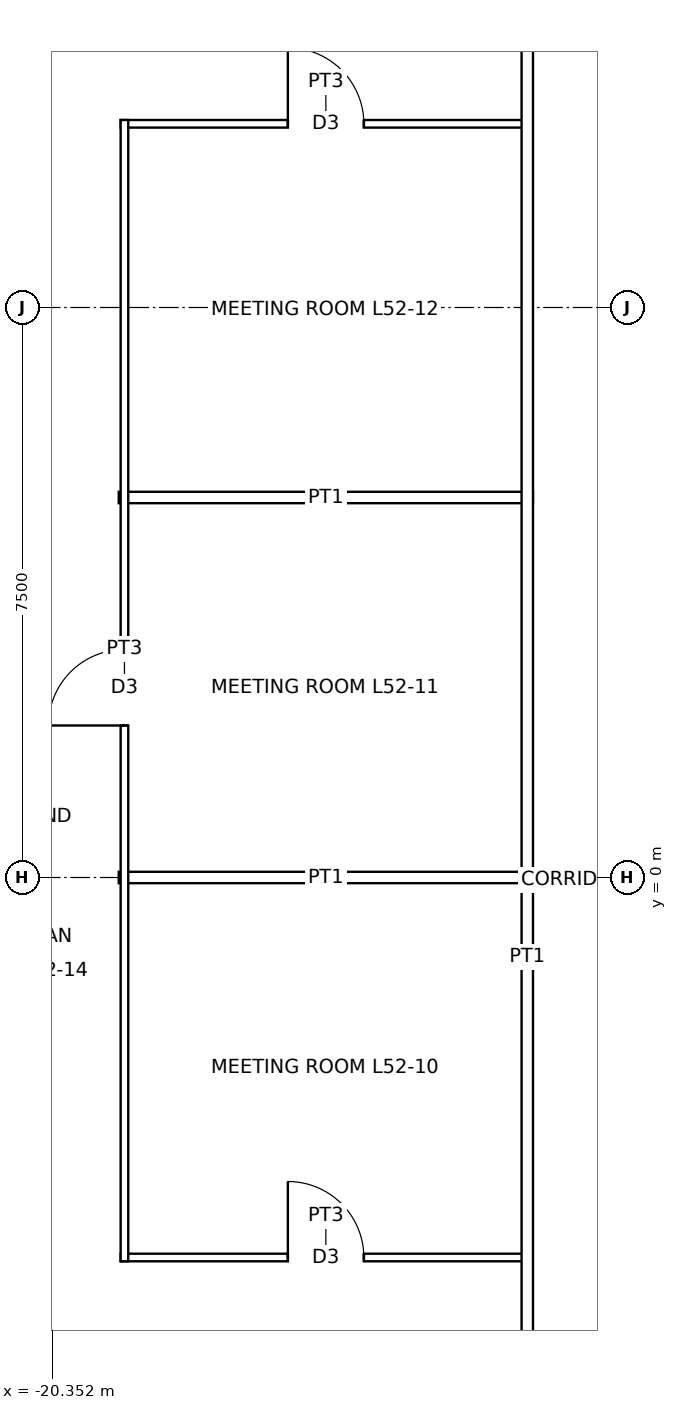
"""IFC4 building model, lengths in metres.
Left out: names, types, materials, properties, quantities, classifications, styles, units other than length and angle.
Written with IfcOpenShell. Run it as: python <this file> out.ifc"""

import sys

from ifc_helpers import new_model, si_unit, direction, frame, frame_2d, origin, place, context, subcontext, project, spatial, rectangle, extrude, element, fill, save


model = new_model("IFC4")
c1 = context("Model", 3, precision=1e-05, world=origin(), true_north=direction((0.0, 1.0)))
c2 = subcontext(c1, "Body", "Model", "MODEL_VIEW")
j1 = project(units=[si_unit("LENGTHUNIT", "METRE"), si_unit("PLANEANGLEUNIT", "RADIAN")], contexts=[c1])
p1 = place(None, origin())
s1 = spatial("IfcSite", under=j1, at=p1, CompositionType="ELEMENT")
p2 = place(p1, origin())
s2 = spatial("IfcBuilding", under=s1, at=p2, CompositionType="ELEMENT")
p3 = place(p2, frame((0.0, 0.0, 241.9)))
s3 = spatial("IfcBuildingStorey", under=s2, at=p3, CompositionType="ELEMENT", Elevation=241.9)
p4 = place(p3, frame((-19.45, -5.0, 0.0), z_axis=(0.0, 0.0, 1.0), x_axis=(1.0, 0.0, 0.0)))
e1 = element("IfcWall", 1, at=p4, inside=s3, PredefinedType="PARTITIONING", context=c2, shape_type="SweptSolid", body=[
    extrude(rectangle(XDim=5.4, YDim=0.1, at=frame_2d((2.7, 0.0))), origin(), (0.0, 0.0, 1.0), 3.85),
])
p5 = place(p4, frame((2.2, 0.0, 0.0)))
e2 = element("IfcOpeningElement", 2, at=p5, cuts=e1, PredefinedType="OPENING", context=c2, shape_type="SweptSolid", body=[
    extrude(rectangle(XDim=1.0, YDim=2.1, at=frame_2d((0.5, 1.05))), frame((0.0, 0.06, 0.0), z_axis=(0.0, -1.0, 0.0), x_axis=(1.0, 0.0, 0.0)), (0.0, 0.0, 1.0), 0.12),
])
p6 = place(p3, frame((-19.475, 0.0, 0.0), z_axis=(0.0, 0.0, 1.0), x_axis=(1.0, 0.0, 0.0)))
e3 = element("IfcWall", 3, at=p6, inside=s3, PredefinedType="PARTITIONING", context=c2, shape_type="SweptSolid", body=[
    extrude(rectangle(XDim=5.45, YDim=0.15, at=frame_2d((2.725, 0.0))), origin(), (0.0, 0.0, 1.0), 3.238),
])
p7 = place(p3, frame((-19.475, 5.0, 0.0), z_axis=(0.0, 0.0, 1.0), x_axis=(1.0, 0.0, 0.0)))
e4 = element("IfcWall", 4, at=p7, inside=s3, PredefinedType="PARTITIONING", context=c2, shape_type="SweptSolid", body=[
    extrude(rectangle(XDim=5.45, YDim=0.15, at=frame_2d((2.725, 0.0))), origin(), (0.0, 0.0, 1.0), 3.85),
])
p8 = place(p3, frame((-19.45, 9.917, 0.0), z_axis=(0.0, 0.0, 1.0), x_axis=(1.0, 0.0, 0.0)))
e5 = element("IfcWall", 5, at=p8, inside=s3, PredefinedType="PARTITIONING", context=c2, shape_type="SweptSolid", body=[
    extrude(rectangle(XDim=5.4, YDim=0.1, at=frame_2d((2.7, 0.0))), origin(), (0.0, 0.0, 1.0), 3.85),
])
p9 = place(p8, frame((2.2, 0.0, 0.0)))
e6 = element("IfcOpeningElement", 6, at=p9, cuts=e5, PredefinedType="OPENING", context=c2, shape_type="SweptSolid", body=[
    extrude(rectangle(XDim=1.0, YDim=2.1, at=frame_2d((0.5, 1.05))), frame((0.0, 0.06, 0.0), z_axis=(0.0, -1.0, 0.0), x_axis=(1.0, 0.0, 0.0)), (0.0, 0.0, 1.0), 0.12),
])
p10 = place(p3, frame((-19.4, -5.05, 0.0), z_axis=(0.0, 0.0, 1.0), x_axis=(0.0, 1.0, 0.0)))
e7 = element("IfcWall", 7, at=p10, inside=s3, PredefinedType="PARTITIONING", context=c2, shape_type="SweptSolid", body=[
    extrude(rectangle(XDim=15.017, YDim=0.1, at=frame_2d((7.509, 0.0))), origin(), (0.0, 0.0, 1.0), 3.85),
])
p11 = place(p10, frame((7.05, 0.0, 0.0)))
e8 = element("IfcOpeningElement", 8, at=p11, cuts=e7, PredefinedType="OPENING", context=c2, shape_type="SweptSolid", body=[
    extrude(rectangle(XDim=1.0, YDim=2.1, at=frame_2d((0.5, 1.05))), frame((0.0, 0.06, 0.0), z_axis=(0.0, -1.0, 0.0), x_axis=(1.0, 0.0, 0.0)), (0.0, 0.0, 1.0), 0.12),
])
p12 = place(p3, frame((-14.1, -14.175, 0.0), z_axis=(0.0, 0.0, 1.0), x_axis=(0.0, 1.0, 0.0)))
e9 = element("IfcWall", 9, at=p12, inside=s3, PredefinedType="PARTITIONING", context=c2, shape_type="SweptSolid", body=[
    extrude(rectangle(XDim=26.25, YDim=0.15, at=frame_2d((13.125, 0.0))), origin(), (0.0, 0.0, 1.0), 3.85),
])
p13 = place(p12, frame((4.125, 0.0, 0.0)))
e10 = element("IfcOpeningElement", 10, at=p13, cuts=e9, PredefinedType="OPENING", context=c2, shape_type="SweptSolid", body=[
    extrude(rectangle(XDim=1.0, YDim=2.4, at=frame_2d((0.5, 1.2))), frame((0.0, 0.085, 0.0), z_axis=(0.0, -1.0, 0.0), x_axis=(1.0, 0.0, 0.0)), (0.0, 0.0, 1.0), 0.17),
])
p14 = place(p5, origin())
e11 = element("IfcDoor", 11, at=p14, inside=s3, OperationType="SINGLE_SWING_LEFT", PredefinedType="DOOR", context=c2, shape_type="SweptSolid", body=[
    extrude(rectangle(XDim=1.0, YDim=2.1, at=frame_2d((0.5, 1.05))), frame((0.0, 0.025, 0.0), z_axis=(0.0, -1.0, 0.0), x_axis=(1.0, 0.0, 0.0)), (0.0, 0.0, 1.0), 0.05),
])
fill(e2, e11)
p15 = place(p11, origin())
e12 = element("IfcDoor", 12, at=p15, inside=s3, OperationType="SINGLE_SWING_LEFT", PredefinedType="DOOR", context=c2, shape_type="SweptSolid", body=[
    extrude(rectangle(XDim=1.0, YDim=2.1, at=frame_2d((0.5, 1.05))), frame((0.0, 0.025, 0.0), z_axis=(0.0, -1.0, 0.0), x_axis=(1.0, 0.0, 0.0)), (0.0, 0.0, 1.0), 0.05),
])
fill(e8, e12)
p16 = place(p9, origin())
e13 = element("IfcDoor", 13, at=p16, inside=s3, OperationType="SINGLE_SWING_LEFT", PredefinedType="DOOR", context=c2, shape_type="SweptSolid", body=[
    extrude(rectangle(XDim=1.0, YDim=2.1, at=frame_2d((0.5, 1.05))), frame((0.0, 0.025, 0.0), z_axis=(0.0, -1.0, 0.0), x_axis=(1.0, 0.0, 0.0)), (0.0, 0.0, 1.0), 0.05),
])
fill(e6, e13)
save(model, sys.argv[1])
